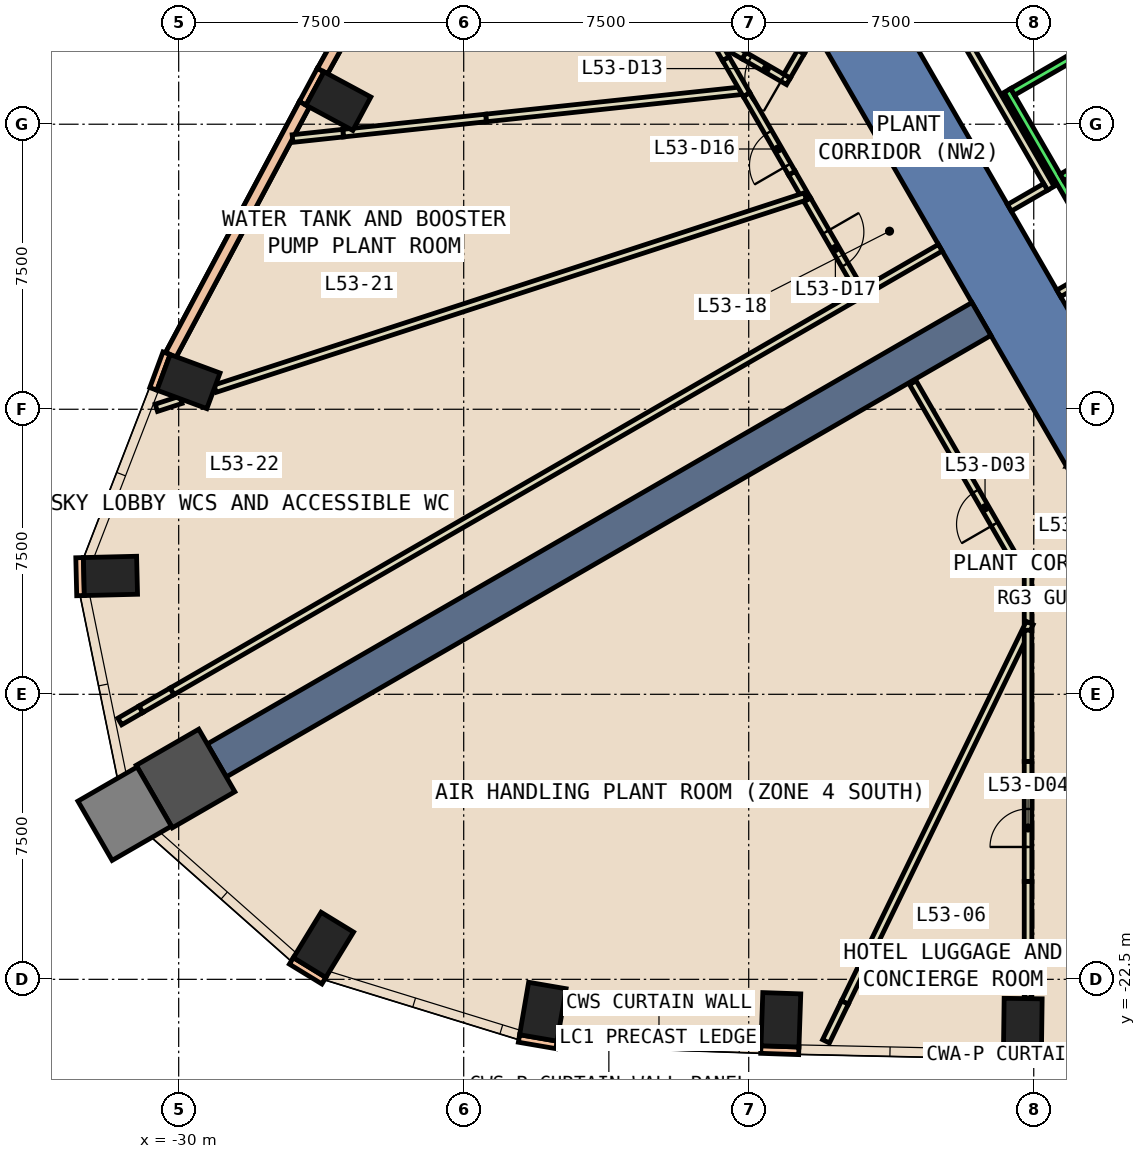
"""IFC4 building model, lengths in metres.
Left out: names, types, materials, properties, quantities, classifications, styles, units other than length and angle.
Written with IfcOpenShell. Run it as: python <this file> out.ifc"""

import sys

from ifc_helpers import new_model, si_unit, direction, frame, frame_2d, origin, origin_2d, place, context, subcontext, project, spatial, polyline, rectangle, outline, extrude, element, fill, save


model = new_model("IFC4")
c1 = context("Model", 3, precision=1e-05, world=origin(), true_north=direction((0.0, 1.0)))
c2 = subcontext(c1, "Body", "Model", "MODEL_VIEW")
j1 = project(units=[si_unit("LENGTHUNIT", "METRE"), si_unit("PLANEANGLEUNIT", "RADIAN")], contexts=[c1])
p1 = place(None, origin())
s1 = spatial("IfcSite", under=j1, at=p1, CompositionType="ELEMENT")
p2 = place(p1, origin())
s2 = spatial("IfcBuilding", under=s1, at=p2, CompositionType="ELEMENT")
p3 = place(p2, frame((0.0, 0.0, 236.0)))
s3 = spatial("IfcBuildingStorey", under=s2, at=p3, CompositionType="ELEMENT", Elevation=236.0)
for number, where, z_axis, x_axis in (
    (1, (-20.417, -23.352, -0.6), (0.0, 0.0, 1.0), (-0.986, 0.169, 0.0)),
    (2, (-14.154, -23.565, -0.6), (0.0, 0.0, 1.0), (-0.999, 0.034, 0.0)),
    (3, (-7.788, -23.706, -0.6), (0.0, 0.0, 1.0), (-1.0, 0.013, 0.0)),
    (4, (-25.797, 0.608, -0.6), (0.0, 0.0, 1.0), (0.474, 0.88, 0.0)),
    (5, (-29.742, -6.772, -0.6), (0.0, 0.0, 1.0), (0.347, 0.938, 0.0)),
    (6, (-31.795, -11.885, -0.6), (0.0, 0.0, 1.0), (-0.025, 1.0, 0.0)),
):
    element("IfcColumn", number, at=place(p3, frame(where, z_axis=z_axis, x_axis=x_axis)), inside=s3, PredefinedType="COLUMN", context=c2, shape_type="SweptSolid", body=[
        extrude(rectangle(XDim=1.0, YDim=1.4, at=origin_2d()), origin(), (0.0, 0.0, 1.0), 5.4),
    ])
p4 = place(p3, frame((-29.82, -17.216, -0.6), z_axis=(0.0, 0.0, 1.0), x_axis=(0.866025403784, 0.5, 0.0)))
e7 = element("IfcColumn", 7, at=p4, inside=s3, PredefinedType="COLUMN", context=c2, shape_type="SweptSolid", body=[
    extrude(rectangle(XDim=1.9, YDim=1.9, at=origin_2d()), origin(), (0.0, 0.0, 1.0), 5.4),
])
p5 = place(p3, frame((-26.19, -21.593, -0.6), z_axis=(0.0, 0.0, 1.0), x_axis=(-0.853423465127, 0.521218178089, 0.0)))
e8 = element("IfcColumn", 8, at=p5, inside=s3, PredefinedType="COLUMN", context=c2, shape_type="SweptSolid", body=[
    extrude(rectangle(XDim=1.0, YDim=1.4, at=origin_2d()), origin(), (0.0, 0.0, 1.0), 5.4),
])
p6 = place(p3, frame((-31.422, -18.141, -0.6), z_axis=(0.0, 0.0, 1.0), x_axis=(0.866025403784, 0.5, 0.0)))
e9 = element("IfcColumn", 9, at=p6, inside=s3, PredefinedType="COLUMN", context=c2, shape_type="SweptSolid", body=[
    extrude(rectangle(XDim=1.8, YDim=1.8, at=origin_2d()), origin(), (0.0, 0.0, 1.0), 5.4),
])
p7 = place(p3, frame((0.0, 0.0, -0.6)))
e10 = element("IfcWall", 10, at=p7, inside=s3, PredefinedType="SHEAR", context=c2, shape_type="SweptSolid", body=[
    extrude(outline(polyline([(-13.279, 2.5), (-6.64, -9.0), (-5.427, -6.9), (-10.854, 2.5), (-13.279, 2.5)])), origin(), (0.0, 0.0, 1.0), 5.4),
])
p8 = place(p3, frame((-8.877, -5.125, 0.0), z_axis=(0.0, 0.0, 1.0), x_axis=(-0.866032640494, -0.499987465442, 0.0)))
e11 = element("IfcWall", 11, at=p8, inside=s3, PredefinedType="SHEAR", context=c2, shape_type="SweptSolid", body=[
    extrude(rectangle(XDim=23.232, YDim=1.0, at=frame_2d((11.616, 0.0))), origin(), (0.0, 0.0, 1.0), 4.8),
])
for number, where, z_axis, x_axis in (
    (12, (-26.264, 1.428, 0.0), (0.0, 0.0, 1.0), (-0.474, -0.881, 0.0)),
    (13, (-30.319, -6.026, 0.0), (0.0, 0.0, 1.0), (-0.347, -0.938, 0.0)),
    (14, (-21.045, -24.056, 0.0), (0.0, 0.0, 1.0), (0.986, -0.169, 0.0)),
):
    element("IfcWall", number, at=place(p3, frame(where, z_axis=z_axis, x_axis=x_axis)), inside=s3, PredefinedType="STANDARD", context=c2, shape_type="SweptSolid", body=[
        extrude(rectangle(XDim=1.0, YDim=0.2, at=frame_2d((0.5, 0.0))), origin(), (0.0, 0.0, 1.0), 4.8),
    ])
p9 = place(p3, frame((-14.681, -24.347, 0.0), z_axis=(0.0, 0.0, 1.0), x_axis=(0.999415245245, -0.034193092457, 0.0)))
e15 = element("IfcWall", 15, at=p9, inside=s3, PredefinedType="STANDARD", context=c2, shape_type="SweptSolid", body=[
    extrude(rectangle(XDim=1.0, YDim=0.2, at=frame_2d((0.5, 0.0))), origin(), (0.0, 0.0, 1.0), 4.8),
])
p10 = place(p3, frame((-8.299, -24.499, 0.0), z_axis=(0.0, 0.0, 1.0), x_axis=(0.999903186316, -0.013914668364, 0.0)))
e16 = element("IfcWall", 16, at=p10, inside=s3, PredefinedType="STANDARD", context=c2, shape_type="SweptSolid", body=[
    extrude(rectangle(XDim=1.0, YDim=0.2, at=frame_2d((0.5, 0.0))), origin(), (0.0, 0.0, 1.0), 4.8),
])
p11 = place(p3, frame((-32.607, -11.405, 0.0), z_axis=(0.0, 0.0, 1.0), x_axis=(0.023942303888, -0.999713341956, 0.0)))
e17 = element("IfcWall", 17, at=p11, inside=s3, PredefinedType="STANDARD", context=c2, shape_type="SweptSolid", body=[
    extrude(rectangle(XDim=0.999, YDim=0.2, at=frame_2d((0.5, 0.0))), origin(), (0.0, 0.0, 1.0), 4.8),
])
p12 = place(p3, frame((-27.034, -22.015, 0.0), z_axis=(0.0, 0.0, 1.0), x_axis=(0.853679739553, -0.520798331677, 0.0)))
e18 = element("IfcWall", 18, at=p12, inside=s3, PredefinedType="STANDARD", context=c2, shape_type="SweptSolid", body=[
    extrude(rectangle(XDim=1.0, YDim=0.2, at=frame_2d((0.5, 0.0))), origin(), (0.0, 0.0, 1.0), 4.8),
])
p13 = place(p3, frame((-22.688, 7.752, 0.0), z_axis=(0.0, 0.0, 1.0), x_axis=(-0.485451767121, -0.874263451025, 0.0)))
e19 = element("IfcWall", 19, at=p13, inside=s3, PredefinedType="STANDARD", context=c2, shape_type="SweptSolid", body=[
    extrude(rectangle(XDim=7.266, YDim=0.3, at=frame_2d((3.633, 0.0))), origin(), (0.0, 0.0, 1.0), 1.2),
])
p14 = place(p3, frame((-22.688, 7.752, 4.0), z_axis=(0.0, 0.0, 1.0), x_axis=(-0.485451767121, -0.874263451025, 0.0)))
e20 = element("IfcWall", 20, at=p14, inside=s3, PredefinedType="STANDARD", context=c2, shape_type="SweptSolid", body=[
    extrude(rectangle(XDim=7.266, YDim=0.3, at=frame_2d((3.633, 0.0))), origin(), (0.0, 0.0, 1.0), 0.8),
])
p15 = place(p3, frame((-26.692, 0.524, 0.0), z_axis=(0.0, 0.0, 1.0), x_axis=(-0.470523779067, -0.882387314807, 0.0)))
e21 = element("IfcWall", 21, at=p15, inside=s3, PredefinedType="STANDARD", context=c2, shape_type="SweptSolid", body=[
    extrude(rectangle(XDim=7.471, YDim=0.3, at=frame_2d((3.735, 0.0))), origin(), (0.0, 0.0, 1.0), 1.2),
])
p16 = place(p3, frame((-26.692, 0.524, 4.0), z_axis=(0.0, 0.0, 1.0), x_axis=(-0.470523779067, -0.882387314807, 0.0)))
e22 = element("IfcWall", 22, at=p16, inside=s3, PredefinedType="STANDARD", context=c2, shape_type="SweptSolid", body=[
    extrude(rectangle(XDim=7.471, YDim=0.3, at=frame_2d((3.735, 0.0))), origin(), (0.0, 0.0, 1.0), 0.8),
])
p17 = place(p3, frame((-9.751, 2.99, 0.0), z_axis=(0.0, 0.0, 1.0), x_axis=(0.499955951776, -0.866050833545, 0.0)))
e23 = element("IfcWall", 23, at=p17, inside=s3, PredefinedType="PARTITIONING", context=c2, shape_type="SweptSolid", body=[
    extrude(rectangle(XDim=5.4, YDim=0.2, at=frame_2d((2.7, 0.0))), origin(), (0.0, 0.0, 1.0), 4.8),
])
p18 = place(p3, frame((-7.188, -1.65, 0.0), z_axis=(0.0, 0.0, 1.0), x_axis=(-0.865841558281, -0.500318294642, 0.0)))
e24 = element("IfcWall", 24, at=p18, inside=s3, PredefinedType="PARTITIONING", context=c2, shape_type="SweptSolid", body=[
    extrude(rectangle(XDim=1.099, YDim=0.2, at=frame_2d((0.55, 0.0))), origin(), (0.0, 0.0, 1.0), 4.8),
])
p19 = place(p3, frame((-6.841, -4.452, 0.0), z_axis=(0.0, 0.0, 1.0), x_axis=(0.86621513555, 0.499671230855, 0.0)))
e25 = element("IfcWall", 25, at=p19, inside=s3, PredefinedType="PARTITIONING", context=c2, shape_type="SweptSolid", body=[
    extrude(rectangle(XDim=1.1, YDim=0.2, at=frame_2d((0.55, 0.0))), origin(), (0.0, 0.0, 1.0), 4.8),
])
p20 = place(p3, frame((-7.65, -13.113, 0.0), z_axis=(0.0, 0.0, 1.0), x_axis=(0.0, 1.0, 0.0)))
e26 = element("IfcWall", 26, at=p20, inside=s3, PredefinedType="PARTITIONING", context=c2, shape_type="SweptSolid", body=[
    extrude(rectangle(XDim=1.813, YDim=0.2, at=frame_2d((0.906, 0.0))), origin(), (0.0, 0.0, 1.0), 4.8),
])
p21 = place(p3, frame((-7.976, -11.487, 0.0), z_axis=(0.0, 0.0, 1.0), x_axis=(-0.499909942208, 0.866077392432, 0.0)))
e27 = element("IfcWall", 27, at=p21, inside=s3, PredefinedType="PARTITIONING", context=c2, shape_type="SweptSolid", body=[
    extrude(rectangle(XDim=5.411, YDim=0.2, at=frame_2d((2.705, 0.0))), origin(), (0.0, 0.0, 1.0), 4.8),
])
p22 = place(p21, frame((1.111, 0.0, 0.0)))
e28 = element("IfcOpeningElement", 28, at=p22, cuts=e27, PredefinedType="OPENING", context=c2, shape_type="SweptSolid", body=[
    extrude(rectangle(XDim=1.0, YDim=2.1, at=frame_2d((0.5, 1.05))), frame((0.0, 0.11, 0.0), z_axis=(0.0, -1.0, 0.0), x_axis=(1.0, 0.0, 0.0)), (0.0, 0.0, 1.0), 0.22),
])
p23 = place(p3, frame((-7.65, -22.988, 0.0), z_axis=(0.0, 0.0, 1.0), x_axis=(0.0, 1.0, 0.0)))
e29 = element("IfcWall", 29, at=p23, inside=s3, PredefinedType="PARTITIONING", context=c2, shape_type="SweptSolid", body=[
    extrude(rectangle(XDim=3.066, YDim=0.2, at=frame_2d((1.533, 0.0))), origin(), (0.0, 0.0, 1.0), 4.8),
])
p24 = place(p3, frame((-7.606, -13.123, 0.0), z_axis=(0.0, 0.0, 1.0), x_axis=(-0.437790876822, -0.899076831073, 0.0)))
e30 = element("IfcWall", 30, at=p24, inside=s3, PredefinedType="PARTITIONING", context=c2, shape_type="SweptSolid", body=[
    extrude(rectangle(XDim=11.108, YDim=0.2, at=frame_2d((5.554, 0.0))), origin(), (0.0, 0.0, 1.0), 4.8),
])
p25 = place(p3, frame((-31.55, -15.715, 0.0), z_axis=(0.0, 0.0, 1.0), x_axis=(0.865781063021, 0.500422972009, 0.0)))
e31 = element("IfcWall", 31, at=p25, inside=s3, PredefinedType="PARTITIONING", context=c2, shape_type="SweptSolid", body=[
    extrude(rectangle(XDim=0.644, YDim=0.2, at=frame_2d((0.322, 0.0))), origin(), (0.0, 0.0, 1.0), 4.8),
])
p26 = place(p3, frame((-13.955, 1.129, 0.0), z_axis=(0.0, 0.0, 1.0), x_axis=(-0.86610721073, 0.499858279437, 0.0)))
e32 = element("IfcWall", 32, at=p26, inside=s3, PredefinedType="PARTITIONING", context=c2, shape_type="SweptSolid", body=[
    extrude(rectangle(XDim=1.349, YDim=0.2, at=frame_2d((0.674, 0.0))), origin(), (0.0, 0.0, 1.0), 2.4),
])
p27 = place(p26, frame((0.17, 0.0, 0.0)))
e33 = element("IfcOpeningElement", 33, at=p27, cuts=e32, PredefinedType="OPENING", context=c2, shape_type="SweptSolid", body=[
    extrude(rectangle(XDim=1.0, YDim=2.1, at=frame_2d((0.5, 1.05))), frame((0.0, 0.11, 0.0), z_axis=(0.0, -1.0, 0.0), x_axis=(1.0, 0.0, 0.0)), (0.0, 0.0, 1.0), 0.22),
])
p28 = place(p3, frame((-13.992, 1.266, 0.0), z_axis=(0.0, 0.0, 1.0), x_axis=(0.500049712553, 0.865996700326, 0.0)))
e34 = element("IfcWall", 34, at=p28, inside=s3, PredefinedType="PARTITIONING", context=c2, shape_type="SweptSolid", body=[
    extrude(rectangle(XDim=0.732, YDim=0.2, at=frame_2d((0.366, 0.0))), origin(), (0.0, 0.0, 1.0), 2.4),
])
p29 = place(p3, frame((-13.46, -1.987, 0.0), z_axis=(0.0, 0.0, 1.0), x_axis=(-0.499670304667, 0.866215669815, 0.0)))
e35 = element("IfcWall", 35, at=p29, inside=s3, PredefinedType="PARTITIONING", context=c2, shape_type="SweptSolid", body=[
    extrude(rectangle(XDim=0.811, YDim=0.2, at=frame_2d((0.405, 0.0))), origin(), (0.0, 0.0, 1.0), 2.4),
])
p30 = place(p3, frame((-13.46, -1.987, 0.0), z_axis=(0.0, 0.0, 1.0), x_axis=(0.499980071345, -0.866036909293, 0.0)))
e36 = element("IfcWall", 36, at=p30, inside=s3, PredefinedType="PARTITIONING", context=c2, shape_type="SweptSolid", body=[
    extrude(rectangle(XDim=2.844, YDim=0.2, at=frame_2d((1.422, 0.0))), origin(), (0.0, 0.0, 1.0), 4.8),
])
p31 = place(p30, frame((0.98, 0.0, 0.0)))
e37 = element("IfcOpeningElement", 37, at=p31, cuts=e36, PredefinedType="OPENING", context=c2, shape_type="SweptSolid", body=[
    extrude(rectangle(XDim=1.0, YDim=2.1, at=frame_2d((0.5, 1.05))), frame((0.0, 0.11, 0.0), z_axis=(0.0, -1.0, 0.0), x_axis=(1.0, 0.0, 0.0)), (0.0, 0.0, 1.0), 0.22),
])
p32 = place(p3, frame((-15.12, 0.889, 0.0), z_axis=(0.0, 0.0, 1.0), x_axis=(-0.994370100713, -0.105962742547, 0.0)))
e38 = element("IfcWall", 38, at=p32, inside=s3, PredefinedType="PARTITIONING", context=c2, shape_type="SweptSolid", body=[
    extrude(rectangle(XDim=6.832, YDim=0.2, at=frame_2d((3.416, 0.0))), origin(), (0.0, 0.0, 1.0), 2.4),
])
p33 = place(p3, frame((-13.51, -1.9, 0.0), z_axis=(0.0, 0.0, 1.0), x_axis=(-0.950838276897, -0.309687860897, 0.0)))
e39 = element("IfcWall", 39, at=p33, inside=s3, PredefinedType="PARTITIONING", context=c2, shape_type="SweptSolid", body=[
    extrude(rectangle(XDim=16.336, YDim=0.2, at=frame_2d((8.168, 0.0))), origin(), (0.0, 0.0, 1.0), 2.4),
])
p34 = place(p3, frame((-29.943, -7.252, 0.0), z_axis=(0.0, 0.0, 1.0), x_axis=(-0.950856641613, -0.309631469817, 0.0)))
e40 = element("IfcWall", 40, at=p34, inside=s3, PredefinedType="PARTITIONING", context=c2, shape_type="SweptSolid", body=[
    extrude(rectangle(XDim=0.678, YDim=0.2, at=frame_2d((0.339, 0.0))), origin(), (0.0, 0.0, 1.0), 4.8),
])
p35 = place(p3, frame((-7.65, -19.922, 0.0), z_axis=(0.0, 0.0, 1.0), x_axis=(0.0, 1.0, 0.0)))
e41 = element("IfcWall", 41, at=p35, inside=s3, PredefinedType="PARTITIONING", context=c2, shape_type="SweptSolid", body=[
    extrude(rectangle(XDim=3.157, YDim=0.2, at=frame_2d((1.579, 0.0))), origin(), (0.0, 0.0, 1.0), 2.4),
])
p36 = place(p35, frame((0.905, 0.0, 0.0)))
e42 = element("IfcOpeningElement", 42, at=p36, cuts=e41, PredefinedType="OPENING", context=c2, shape_type="SweptSolid", body=[
    extrude(rectangle(XDim=1.0, YDim=2.1, at=frame_2d((0.5, 1.05))), frame((0.0, 0.11, 0.0), z_axis=(0.0, -1.0, 0.0), x_axis=(1.0, 0.0, 0.0)), (0.0, 0.0, 1.0), 0.22),
])
p37 = place(p3, frame((-7.65, -16.765, 0.0), z_axis=(0.0, 0.0, 1.0), x_axis=(0.0, 1.0, 0.0)))
e43 = element("IfcWall", 43, at=p37, inside=s3, PredefinedType="PARTITIONING", context=c2, shape_type="SweptSolid", body=[
    extrude(rectangle(XDim=3.452, YDim=0.2, at=frame_2d((1.726, 0.0))), origin(), (0.0, 0.0, 1.0), 4.8),
])
p38 = place(p3, frame((-12.469, -23.11, 0.0), z_axis=(0.0, 0.0, 1.0), x_axis=(-0.437728823941, -0.899107044067, 0.0)))
e44 = element("IfcWall", 44, at=p38, inside=s3, PredefinedType="PARTITIONING", context=c2, shape_type="SweptSolid", body=[
    extrude(rectangle(XDim=1.135, YDim=0.2, at=frame_2d((0.568, 0.0))), origin(), (0.0, 0.0, 1.0), 2.4),
])
p39 = place(p3, frame((-30.993, -15.393, 0.0), z_axis=(0.0, 0.0, 1.0), x_axis=(0.866108284413, 0.499856419056, 0.0)))
e45 = element("IfcWall", 45, at=p39, inside=s3, PredefinedType="PARTITIONING", context=c2, shape_type="SweptSolid", body=[
    extrude(rectangle(XDim=0.947, YDim=0.2, at=frame_2d((0.473, 0.0))), origin(), (0.0, 0.0, 1.0), 2.4),
])
p40 = place(p3, frame((-30.173, -14.92, 0.0), z_axis=(0.0, 0.0, 1.0), x_axis=(0.866038403425, 0.499977483287, 0.0)))
e46 = element("IfcWall", 46, at=p40, inside=s3, PredefinedType="PARTITIONING", context=c2, shape_type="SweptSolid", body=[
    extrude(rectangle(XDim=23.341, YDim=0.2, at=frame_2d((11.67, 0.0))), origin(), (0.0, 0.0, 1.0), 4.8),
])
p41 = place(p3, frame((-15.123, 1.803, 0.0), z_axis=(0.0, 0.0, 1.0), x_axis=(-0.865652990476, 0.500644484719, 0.0)))
e47 = element("IfcWall", 47, at=p41, inside=s3, PredefinedType="PARTITIONING", context=c2, shape_type="SweptSolid", body=[
    extrude(rectangle(XDim=0.909, YDim=0.2, at=frame_2d((0.455, 0.0))), origin(), (0.0, 0.0, 1.0), 4.8),
])
p42 = place(p3, frame((-13.626, 1.9, 0.0), z_axis=(0.0, 0.0, 1.0), x_axis=(0.500494699761, 0.86573960029, 0.0)))
e48 = element("IfcWall", 48, at=p42, inside=s3, PredefinedType="PARTITIONING", context=c2, shape_type="SweptSolid", body=[
    extrude(rectangle(XDim=0.693, YDim=0.2, at=frame_2d((0.347, 0.0))), origin(), (0.0, 0.0, 1.0), 4.8),
])
p43 = place(p3, frame((-13.865, -1.285, 0.0), z_axis=(0.0, 0.0, 1.0), x_axis=(-0.499905644439, 0.86607987314, 0.0)))
e49 = element("IfcWall", 49, at=p43, inside=s3, PredefinedType="PARTITIONING", context=c2, shape_type="SweptSolid", body=[
    extrude(rectangle(XDim=2.384, YDim=0.2, at=frame_2d((1.192, 0.0))), origin(), (0.0, 0.0, 1.0), 4.8),
])
p44 = place(p43, frame((0.231, 0.0, 0.0)))
e50 = element("IfcOpeningElement", 50, at=p44, cuts=e49, PredefinedType="OPENING", context=c2, shape_type="SweptSolid", body=[
    extrude(rectangle(XDim=1.0, YDim=2.1, at=frame_2d((0.5, 1.05))), frame((0.0, 0.11, 0.0), z_axis=(0.0, -1.0, 0.0), x_axis=(1.0, 0.0, 0.0)), (0.0, 0.0, 1.0), 0.22),
])
p45 = place(p3, frame((-15.057, 0.78, 0.0), z_axis=(0.0, 0.0, 1.0), x_axis=(-0.500348398615, 0.865824162289, 0.0)))
e51 = element("IfcWall", 51, at=p45, inside=s3, PredefinedType="PARTITIONING", context=c2, shape_type="SweptSolid", body=[
    extrude(rectangle(XDim=1.092, YDim=0.2, at=frame_2d((0.546, 0.0))), origin(), (0.0, 0.0, 1.0), 2.4),
])
p46 = place(p3, frame((-15.603, 1.725, 0.0), z_axis=(0.0, 0.0, 1.0), x_axis=(-0.499594255707, 0.866259533664, 0.0)))
e52 = element("IfcWall", 52, at=p46, inside=s3, PredefinedType="PARTITIONING", context=c2, shape_type="SweptSolid", body=[
    extrude(rectangle(XDim=0.714, YDim=0.2, at=frame_2d((0.357, 0.0))), origin(), (0.0, 0.0, 1.0), 4.8),
])
p47 = place(p3, frame((-21.913, 0.165, 0.0), z_axis=(0.0, 0.0, 1.0), x_axis=(-0.994387757351, -0.105796918812, 0.0)))
e53 = element("IfcWall", 53, at=p47, inside=s3, PredefinedType="PARTITIONING", context=c2, shape_type="SweptSolid", body=[
    extrude(rectangle(XDim=3.782, YDim=0.2, at=frame_2d((1.891, 0.0))), origin(), (0.0, 0.0, 1.0), 4.8),
])
p48 = place(p3, frame((-25.674, -0.235, 0.0), z_axis=(0.0, 0.0, 1.0), x_axis=(-0.994351234006, -0.106139641183, 0.0)))
e54 = element("IfcWall", 54, at=p48, inside=s3, PredefinedType="PARTITIONING", context=c2, shape_type="SweptSolid", body=[
    extrude(rectangle(XDim=1.336, YDim=0.2, at=frame_2d((0.668, 0.0))), origin(), (0.0, 0.0, 1.0), 2.4),
])
p49 = place(p3, frame((-8.192, 0.888, 0.0), z_axis=(0.0, 0.0, 1.0), x_axis=(0.500034260056, -0.866005622828, 0.0)))
e55 = element("IfcWall", 55, at=p49, inside=s3, PredefinedType="STANDARD", context=c2, shape_type="SweptSolid", body=[
    extrude(rectangle(XDim=5.399, YDim=0.2, at=frame_2d((2.7, 0.0))), origin(), (0.0, 0.0, 1.0), 4.8),
])
for number, where, z_axis, x_axis in (
    (56, (-5.977, 2.052, 0.0), (0.0, 0.0, 1.0), (-0.866, -0.5, 0.0)),
    (57, (-4.677, -0.2, 0.0), (0.0, 0.0, 1.0), (-0.866, -0.5, 0.0)),
):
    element("IfcWall", number, at=place(p3, frame(where, z_axis=z_axis, x_axis=x_axis)), inside=s3, PredefinedType="STANDARD", context=c2, shape_type="SweptSolid", body=[
        extrude(rectangle(XDim=2.399, YDim=0.2, at=frame_2d((1.2, 0.0))), origin(), (0.0, 0.0, 1.0), 4.8),
    ])
p50 = place(p22, origin())
e58 = element("IfcDoor", 58, at=p50, inside=s3, OperationType="SINGLE_SWING_LEFT", PredefinedType="DOOR", context=c2, shape_type="SweptSolid", body=[
    extrude(rectangle(XDim=1.0, YDim=2.1, at=frame_2d((0.5, 1.05))), frame((0.0, 0.025, 0.0), z_axis=(0.0, -1.0, 0.0), x_axis=(1.0, 0.0, 0.0)), (0.0, 0.0, 1.0), 0.05),
])
fill(e28, e58)
p51 = place(p36, origin())
e59 = element("IfcDoor", 59, at=p51, inside=s3, OperationType="SINGLE_SWING_RIGHT", PredefinedType="DOOR", context=c2, shape_type="SweptSolid", body=[
    extrude(rectangle(XDim=1.0, YDim=2.1, at=frame_2d((0.5, 1.05))), frame((0.0, 0.025, 0.0), z_axis=(0.0, -1.0, 0.0), x_axis=(1.0, 0.0, 0.0)), (0.0, 0.0, 1.0), 0.05),
])
fill(e42, e59)
p52 = place(p27, origin())
e60 = element("IfcDoor", 60, at=p52, inside=s3, OperationType="SINGLE_SWING_LEFT", PredefinedType="DOOR", context=c2, shape_type="SweptSolid", body=[
    extrude(rectangle(XDim=1.0, YDim=2.1, at=frame_2d((0.5, 1.05))), frame((0.0, 0.025, 0.0), z_axis=(0.0, -1.0, 0.0), x_axis=(1.0, 0.0, 0.0)), (0.0, 0.0, 1.0), 0.05),
])
fill(e33, e60)
p53 = place(p44, origin())
e61 = element("IfcDoor", 61, at=p53, inside=s3, OperationType="SINGLE_SWING_RIGHT", PredefinedType="DOOR", context=c2, shape_type="SweptSolid", body=[
    extrude(rectangle(XDim=1.0, YDim=2.1, at=frame_2d((0.5, 1.05))), frame((0.0, 0.025, 0.0), z_axis=(0.0, -1.0, 0.0), x_axis=(1.0, 0.0, 0.0)), (0.0, 0.0, 1.0), 0.05),
])
fill(e50, e61)
p54 = place(p31, origin())
e62 = element("IfcDoor", 62, at=p54, inside=s3, OperationType="SINGLE_SWING_LEFT", PredefinedType="DOOR", context=c2, shape_type="SweptSolid", body=[
    extrude(rectangle(XDim=1.0, YDim=2.1, at=frame_2d((0.5, 1.05))), frame((0.0, 0.025, 0.0), z_axis=(0.0, -1.0, 0.0), x_axis=(1.0, 0.0, 0.0)), (0.0, 0.0, 1.0), 0.05),
])
fill(e37, e62)
save(model, sys.argv[1])
